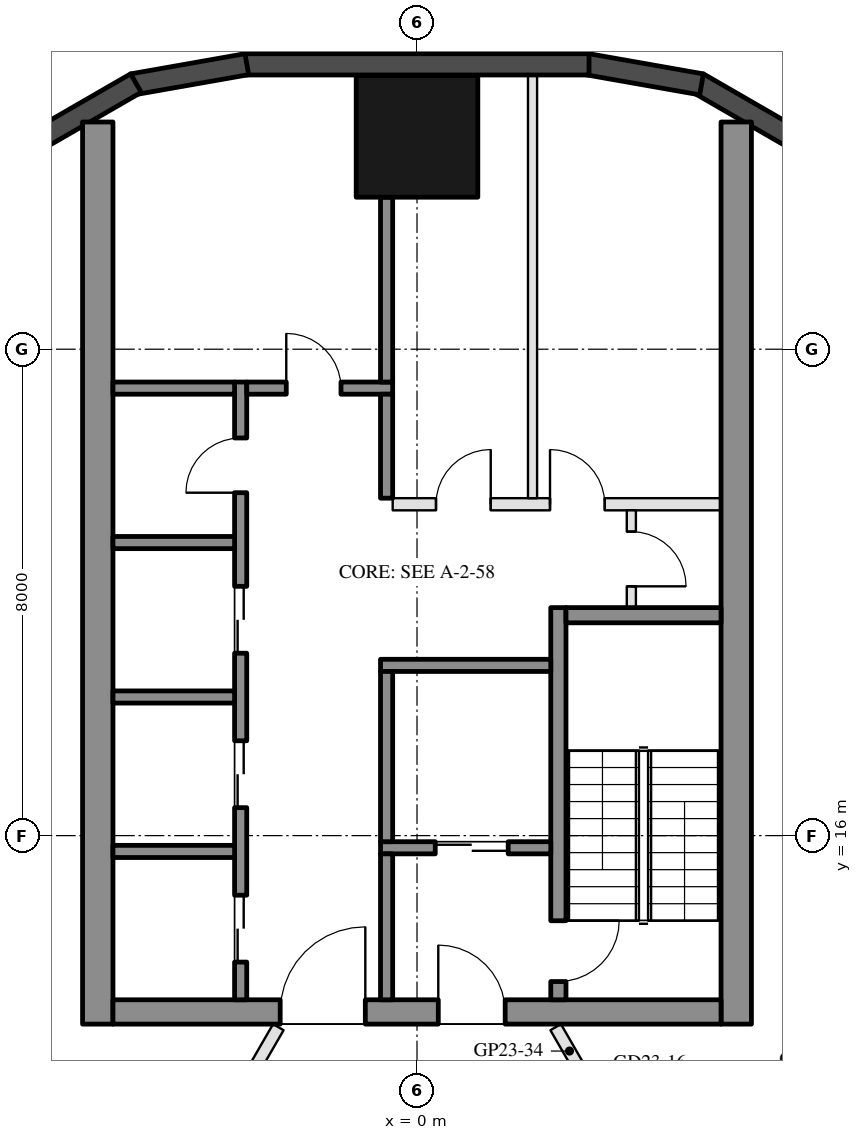
"""IFC4 building model, lengths in metres.
Left out: names, types, materials, properties, quantities, classifications, styles, units other than length and angle.
Written with IfcOpenShell. Run it as: python <this file> out.ifc"""

import sys

from ifc_helpers import new_model, si_unit, direction, frame, frame_2d, origin, origin_2d, place, context, subcontext, project, spatial, rectangle, hollow_rectangle, extrude, boolean, halfspace, element, fill, save


model = new_model("IFC4")
c1 = context("Model", 3, precision=1e-05, world=origin(), true_north=direction((0.0, 1.0)))
c2 = subcontext(c1, "Body", "Model", "MODEL_VIEW")
j1 = project(units=[si_unit("LENGTHUNIT", "METRE"), si_unit("PLANEANGLEUNIT", "RADIAN")], contexts=[c1])
p1 = place(None, origin())
s1 = spatial("IfcSite", under=j1, at=p1, CompositionType="ELEMENT")
p2 = place(p1, origin())
s2 = spatial("IfcBuilding", under=s1, at=p2, CompositionType="ELEMENT")
p3 = place(p2, frame((0.0, 0.0, 250.4)))
s3 = spatial("IfcBuildingStorey", under=s2, at=p3, CompositionType="ELEMENT", Elevation=250.4)
p4 = place(p3, frame((0.0, 27.5, 0.0), z_axis=(0.0, 0.0, 1.0), x_axis=(1.0, 0.0, 0.0)))
e1 = element("IfcColumn", 1, at=p4, inside=s3, PredefinedType="COLUMN", context=c2, shape_type="SweptSolid", body=[
    boolean("DIFFERENCE", extrude(hollow_rectangle(XDim=2.0, YDim=2.0, WallThickness=0.05, at=origin_2d()), origin(), (0.0, 0.0, 1.0), 3.7), halfspace(frame((0.0, 0.0, 3.588), z_axis=(0.0, 0.0, 1.0), x_axis=(1.0, 0.0, 0.0)), False)),
])
for number, where, z_axis, x_axis in (
    (2, (6.277, 27.422, 0.0), (0.0, 0.0, 1.0), (-0.866, 0.5, 0.0)),
    (3, (4.68, 28.356, 0.0), (0.0, 0.0, 1.0), (-0.985, 0.174, 0.0)),
):
    element("IfcWall", number, at=place(p3, frame(where, z_axis=z_axis, x_axis=x_axis)), inside=s3, PredefinedType="SOLIDWALL", context=c2, shape_type="SweptSolid", body=[
        extrude(rectangle(XDim=1.91, YDim=0.35, at=frame_2d((0.955, 0.0))), origin(), (0.0, 0.0, 1.0), 3.55),
    ])
p5 = place(p3, frame((2.829, 28.685, 0.0), z_axis=(0.0, 0.0, 1.0), x_axis=(-1.0, 0.0, 0.0)))
e4 = element("IfcWall", 4, at=p5, inside=s3, PredefinedType="SOLIDWALL", context=c2, shape_type="SweptSolid", body=[
    extrude(rectangle(XDim=5.658, YDim=0.35, at=frame_2d((2.829, 0.0))), origin(), (0.0, 0.0, 1.0), 3.55),
])
for number, where, z_axis, x_axis in (
    (5, (-2.799, 28.688, 0.0), (0.0, 0.0, 1.0), (-0.985, -0.174, 0.0)),
    (6, (-4.623, 28.377, 0.0), (0.0, 0.0, 1.0), (-0.866, -0.5, 0.0)),
):
    element("IfcWall", number, at=place(p3, frame(where, z_axis=z_axis, x_axis=x_axis)), inside=s3, PredefinedType="SOLIDWALL", context=c2, shape_type="SweptSolid", body=[
        extrude(rectangle(XDim=1.91, YDim=0.35, at=frame_2d((0.955, 0.0))), origin(), (0.0, 0.0, 1.0), 3.55),
    ])
for number, where, z_axis, x_axis in (
    (7, (5.25, 12.9, 0.0), (0.0, 0.0, 1.0), (0.0, 1.0, 0.0)),
    (8, (-5.25, 12.9, 0.0), (0.0, 0.0, 1.0), (0.0, 1.0, 0.0)),
):
    element("IfcWall", number, at=place(p3, frame(where, z_axis=z_axis, x_axis=x_axis)), inside=s3, PredefinedType="SHEAR", context=c2, shape_type="SweptSolid", body=[
        extrude(rectangle(XDim=14.837, YDim=0.5, at=frame_2d((7.418, 0.0))), origin(), (0.0, 0.0, 1.0), 3.5),
    ])
p6 = place(p3, frame((5.0, 13.1, 0.0), z_axis=(0.0, 0.0, 1.0), x_axis=(-1.0, 0.0, 0.0)))
e9 = element("IfcWall", 9, at=p6, inside=s3, PredefinedType="SHEAR", context=c2, shape_type="SweptSolid", body=[
    extrude(rectangle(XDim=10.0, YDim=0.4, at=frame_2d((5.0, 0.0))), origin(), (0.0, 0.0, 1.0), 3.5),
])
p7 = place(p6, frame((3.55, 0.0, 0.0)))
e10 = element("IfcOpeningElement", 10, at=p7, cuts=e9, PredefinedType="OPENING", context=c2, shape_type="SweptSolid", body=[
    extrude(rectangle(XDim=1.1, YDim=2.1, at=frame_2d((0.55, 1.05))), frame((0.0, 0.21, 0.0), z_axis=(0.0, -1.0, 0.0), x_axis=(1.0, 0.0, 0.0)), (0.0, 0.0, 1.0), 0.42),
])
p8 = place(p6, frame((5.85, 0.0, 0.0)))
e11 = element("IfcOpeningElement", 11, at=p8, cuts=e9, PredefinedType="OPENING", context=c2, shape_type="SweptSolid", body=[
    extrude(rectangle(XDim=1.4, YDim=2.1, at=frame_2d((0.7, 1.05))), frame((0.0, 0.21, 0.0), z_axis=(0.0, -1.0, 0.0), x_axis=(1.0, 0.0, 0.0)), (0.0, 0.0, 1.0), 0.42),
])
p9 = place(p3, frame((2.325, 13.3, 0.0), z_axis=(0.0, 0.0, 1.0), x_axis=(0.0, 1.0, 0.0)))
e12 = element("IfcWall", 12, at=p9, inside=s3, PredefinedType="SHEAR", context=c2, shape_type="SweptSolid", body=[
    extrude(rectangle(XDim=6.45, YDim=0.25, at=frame_2d((3.225, 0.0))), origin(), (0.0, 0.0, 1.0), 3.5),
])
p10 = place(p9, frame((0.3, 0.0, 0.0)))
e13 = element("IfcOpeningElement", 13, at=p10, cuts=e12, PredefinedType="OPENING", context=c2, shape_type="SweptSolid", body=[
    extrude(rectangle(XDim=1.0, YDim=2.1, at=frame_2d((0.5, 1.05))), frame((0.0, 0.135, 0.0), z_axis=(0.0, -1.0, 0.0), x_axis=(1.0, 0.0, 0.0)), (0.0, 0.0, 1.0), 0.27),
])
p11 = place(p3, frame((5.0, 19.625, 0.0), z_axis=(0.0, 0.0, 1.0), x_axis=(-1.0, 0.0, 0.0)))
e14 = element("IfcWall", 14, at=p11, inside=s3, PredefinedType="SHEAR", context=c2, shape_type="SweptSolid", body=[
    extrude(rectangle(XDim=2.55, YDim=0.25, at=frame_2d((1.275, 0.0))), origin(), (0.0, 0.0, 1.0), 3.5),
])
p12 = place(p3, frame((2.2, 18.8, 0.0), z_axis=(0.0, 0.0, 1.0), x_axis=(-1.0, 0.0, 0.0)))
e15 = element("IfcWall", 15, at=p12, inside=s3, PredefinedType="SHEAR", context=c2, shape_type="SweptSolid", body=[
    extrude(rectangle(XDim=2.8, YDim=0.2, at=frame_2d((1.4, 0.0))), origin(), (0.0, 0.0, 1.0), 3.5),
])
p13 = place(p3, frame((2.2, 15.8, 0.0), z_axis=(0.0, 0.0, 1.0), x_axis=(-1.0, 0.0, 0.0)))
e16 = element("IfcWall", 16, at=p13, inside=s3, PredefinedType="SHEAR", context=c2, shape_type="SweptSolid", body=[
    extrude(rectangle(XDim=2.8, YDim=0.2, at=frame_2d((1.4, 0.0))), origin(), (0.0, 0.0, 1.0), 3.5),
])
p14 = place(p13, frame((0.7, 0.0, 0.0)))
e17 = element("IfcOpeningElement", 17, at=p14, cuts=e16, PredefinedType="OPENING", context=c2, shape_type="SweptSolid", body=[
    extrude(rectangle(XDim=1.2, YDim=2.1, at=frame_2d((0.6, 1.05))), frame((0.0, 0.11, 0.0), z_axis=(0.0, -1.0, 0.0), x_axis=(1.0, 0.0, 0.0)), (0.0, 0.0, 1.0), 0.22),
])
p15 = place(p3, frame((-0.5, 15.9, 0.0), z_axis=(0.0, 0.0, 1.0), x_axis=(0.0, 1.0, 0.0)))
e18 = element("IfcWall", 18, at=p15, inside=s3, PredefinedType="SHEAR", context=c2, shape_type="SweptSolid", body=[
    extrude(rectangle(XDim=2.8, YDim=0.2, at=frame_2d((1.4, 0.0))), origin(), (0.0, 0.0, 1.0), 3.5),
])
p16 = place(p3, frame((-0.5, 13.3, 0.0), z_axis=(0.0, 0.0, 1.0), x_axis=(0.0, 1.0, 0.0)))
e19 = element("IfcWall", 19, at=p16, inside=s3, PredefinedType="SHEAR", context=c2, shape_type="SweptSolid", body=[
    extrude(rectangle(XDim=2.4, YDim=0.2, at=frame_2d((1.2, 0.0))), origin(), (0.0, 0.0, 1.0), 3.5),
])
p17 = place(p3, frame((-2.9, 13.3, 0.0), z_axis=(0.0, 0.0, 1.0), x_axis=(0.0, 1.0, 0.0)))
e20 = element("IfcWall", 20, at=p17, inside=s3, PredefinedType="SHEAR", context=c2, shape_type="SweptSolid", body=[
    extrude(rectangle(XDim=10.16, YDim=0.2, at=frame_2d((5.08, 0.0))), origin(), (0.0, 0.0, 1.0), 3.5),
])
p18 = place(p17, frame((0.62, 0.0, 0.0)))
e21 = element("IfcOpeningElement", 21, at=p18, cuts=e20, PredefinedType="OPENING", context=c2, shape_type="SweptSolid", body=[
    extrude(rectangle(XDim=1.1, YDim=2.1, at=frame_2d((0.55, 1.05))), frame((0.0, 0.11, 0.0), z_axis=(0.0, -1.0, 0.0), x_axis=(1.0, 0.0, 0.0)), (0.0, 0.0, 1.0), 0.22),
])
p19 = place(p17, frame((3.16, 0.0, 0.0)))
e22 = element("IfcOpeningElement", 22, at=p19, cuts=e20, PredefinedType="OPENING", context=c2, shape_type="SweptSolid", body=[
    extrude(rectangle(XDim=1.1, YDim=2.1, at=frame_2d((0.55, 1.05))), frame((0.0, 0.11, 0.0), z_axis=(0.0, -1.0, 0.0), x_axis=(1.0, 0.0, 0.0)), (0.0, 0.0, 1.0), 0.22),
])
p20 = place(p17, frame((5.7, 0.0, 0.0)))
e23 = element("IfcOpeningElement", 23, at=p20, cuts=e20, PredefinedType="OPENING", context=c2, shape_type="SweptSolid", body=[
    extrude(rectangle(XDim=1.1, YDim=2.1, at=frame_2d((0.55, 1.05))), frame((0.0, 0.11, 0.0), z_axis=(0.0, -1.0, 0.0), x_axis=(1.0, 0.0, 0.0)), (0.0, 0.0, 1.0), 0.22),
])
p21 = place(p17, frame((8.34, 0.0, 0.0)))
e24 = element("IfcOpeningElement", 24, at=p21, cuts=e20, PredefinedType="OPENING", context=c2, shape_type="SweptSolid", body=[
    extrude(rectangle(XDim=0.9, YDim=2.1, at=frame_2d((0.45, 1.05))), frame((0.0, 0.11, 0.0), z_axis=(0.0, -1.0, 0.0), x_axis=(1.0, 0.0, 0.0)), (0.0, 0.0, 1.0), 0.22),
])
p22 = place(p3, frame((-0.4, 23.36, 0.0), z_axis=(0.0, 0.0, 1.0), x_axis=(-1.0, 0.0, 0.0)))
e25 = element("IfcWall", 25, at=p22, inside=s3, PredefinedType="SHEAR", context=c2, shape_type="SweptSolid", body=[
    extrude(rectangle(XDim=2.4, YDim=0.2, at=frame_2d((1.2, 0.0))), origin(), (0.0, 0.0, 1.0), 3.5),
])
p23 = place(p22, frame((0.85, 0.0, 0.0)))
e26 = element("IfcOpeningElement", 26, at=p23, cuts=e25, PredefinedType="OPENING", context=c2, shape_type="SweptSolid", body=[
    extrude(rectangle(XDim=0.9, YDim=2.1, at=frame_2d((0.45, 1.05))), frame((0.0, 0.11, 0.0), z_axis=(0.0, -1.0, 0.0), x_axis=(1.0, 0.0, 0.0)), (0.0, 0.0, 1.0), 0.22),
])
p24 = place(p3, frame((-0.5, 21.55, 0.0), z_axis=(0.0, 0.0, 1.0), x_axis=(0.0, 1.0, 0.0)))
e27 = element("IfcWall", 27, at=p24, inside=s3, PredefinedType="SHEAR", context=c2, shape_type="SweptSolid", body=[
    extrude(rectangle(XDim=1.71, YDim=0.2, at=frame_2d((0.855, 0.0))), origin(), (0.0, 0.0, 1.0), 3.5),
])
for number, where, z_axis, x_axis in (
    (28, (-3.0, 15.74, 0.0), (0.0, 0.0, 1.0), (-1.0, 0.0, 0.0)),
    (29, (-3.0, 18.28, 0.0), (0.0, 0.0, 1.0), (-1.0, 0.0, 0.0)),
    (30, (-3.0, 20.82, 0.0), (0.0, 0.0, 1.0), (-1.0, 0.0, 0.0)),
    (31, (-3.0, 23.36, 0.0), (0.0, 0.0, 1.0), (-1.0, 0.0, 0.0)),
):
    element("IfcWall", number, at=place(p3, frame(where, z_axis=z_axis, x_axis=x_axis)), inside=s3, PredefinedType="SHEAR", context=c2, shape_type="SweptSolid", body=[
        extrude(rectangle(XDim=2.0, YDim=0.2, at=frame_2d((1.0, 0.0))), origin(), (0.0, 0.0, 1.0), 3.5),
    ])
p25 = place(p3, frame((-0.5, 23.46, 0.0), z_axis=(0.0, 0.0, 1.0), x_axis=(0.0, 1.0, 0.0)))
e32 = element("IfcWall", 32, at=p25, inside=s3, PredefinedType="SHEAR", context=c2, shape_type="SweptSolid", body=[
    extrude(rectangle(XDim=3.04, YDim=0.2, at=frame_2d((1.52, 0.0))), origin(), (0.0, 0.0, 1.0), 3.5),
])
p26 = place(p3, frame((5.0, 21.45, 0.0), z_axis=(0.0, 0.0, 1.0), x_axis=(-1.0, 0.0, 0.0)))
e33 = element("IfcWall", 33, at=p26, inside=s3, PredefinedType="PARTITIONING", context=c2, shape_type="SweptSolid", body=[
    extrude(rectangle(XDim=5.4, YDim=0.2, at=frame_2d((2.7, 0.0))), origin(), (0.0, 0.0, 1.0), 3.5),
])
p27 = place(p26, frame((1.913, 0.0, 0.0)))
e34 = element("IfcOpeningElement", 34, at=p27, cuts=e33, PredefinedType="OPENING", context=c2, shape_type="SweptSolid", body=[
    extrude(rectangle(XDim=0.9, YDim=2.1, at=frame_2d((0.45, 1.05))), frame((0.0, 0.11, 0.0), z_axis=(0.0, -1.0, 0.0), x_axis=(1.0, 0.0, 0.0)), (0.0, 0.0, 1.0), 0.22),
])
p28 = place(p26, frame((3.788, 0.0, 0.0)))
e35 = element("IfcOpeningElement", 35, at=p28, cuts=e33, PredefinedType="OPENING", context=c2, shape_type="SweptSolid", body=[
    extrude(rectangle(XDim=0.9, YDim=2.1, at=frame_2d((0.45, 1.05))), frame((0.0, 0.11, 0.0), z_axis=(0.0, -1.0, 0.0), x_axis=(1.0, 0.0, 0.0)), (0.0, 0.0, 1.0), 0.22),
])
p29 = place(p3, frame((3.525, 19.75, 0.0), z_axis=(0.0, 0.0, 1.0), x_axis=(0.0, 1.0, 0.0)))
e36 = element("IfcWall", 36, at=p29, inside=s3, PredefinedType="PARTITIONING", context=c2, shape_type="SweptSolid", body=[
    extrude(rectangle(XDim=1.6, YDim=0.15, at=frame_2d((0.8, 0.0))), origin(), (0.0, 0.0, 1.0), 3.5),
])
p30 = place(p29, frame((0.35, 0.0, 0.0)))
e37 = element("IfcOpeningElement", 37, at=p30, cuts=e36, PredefinedType="OPENING", context=c2, shape_type="SweptSolid", body=[
    extrude(rectangle(XDim=0.9, YDim=2.1, at=frame_2d((0.45, 1.05))), frame((0.0, 0.085, 0.0), z_axis=(0.0, -1.0, 0.0), x_axis=(1.0, 0.0, 0.0)), (0.0, 0.0, 1.0), 0.17),
])
p31 = place(p3, frame((1.9, 21.55, 0.0), z_axis=(0.0, 0.0, 1.0), x_axis=(0.0, 1.0, 0.0)))
e38 = element("IfcWall", 38, at=p31, inside=s3, PredefinedType="PARTITIONING", context=c2, shape_type="SweptSolid", body=[
    extrude(rectangle(XDim=6.95, YDim=0.15, at=frame_2d((3.475, 0.0))), origin(), (0.0, 0.0, 1.0), 3.5),
])
p32 = place(p3, frame((13.952, 14.395, 0.0), z_axis=(0.0, 0.0, 1.0), x_axis=(-0.892890171934, -0.450274517226, 0.0)))
e39 = element("IfcWall", 39, at=p32, inside=s3, PredefinedType="PARTITIONING", context=c2, shape_type="SweptSolid", body=[
    extrude(rectangle(XDim=10.998, YDim=0.2, at=frame_2d((5.499, 0.0))), origin(), (0.0, 0.0, 1.0), 3.1),
])
p33 = place(p3, frame((2.281, 12.85, 0.0), z_axis=(0.0, 0.0, 1.0), x_axis=(0.499985062256, -0.866034027923, 0.0)))
e40 = element("IfcWall", 40, at=p33, inside=s3, PredefinedType="PARTITIONING", context=c2, shape_type="SweptSolid", body=[
    extrude(rectangle(XDim=3.782, YDim=0.2, at=frame_2d((1.891, 0.0))), origin(), (0.0, 0.0, 1.0), 2.95),
])
p34 = place(p33, frame((1.391, 0.0, 0.0)))
e41 = element("IfcOpeningElement", 41, at=p34, cuts=e40, PredefinedType="OPENING", context=c2, shape_type="SweptSolid", body=[
    extrude(rectangle(XDim=1.0, YDim=2.1, at=frame_2d((0.5, 1.05))), frame((0.0, 0.11, 0.0), z_axis=(0.0, -1.0, 0.0), x_axis=(1.0, 0.0, 0.0)), (0.0, 0.0, 1.0), 0.22),
])
p35 = place(p3, frame((-5.221, 7.757, 0.0), z_axis=(0.0, 0.0, 1.0), x_axis=(0.49998360248, 0.86603487069, 0.0)))
e42 = element("IfcWall", 42, at=p35, inside=s3, PredefinedType="PARTITIONING", context=c2, shape_type="SweptSolid", body=[
    extrude(rectangle(XDim=5.881, YDim=0.2, at=frame_2d((2.94, 0.0))), origin(), (0.0, 0.0, 1.0), 2.95),
])
p36 = place(p35, frame((2.44, 0.0, 0.0)))
e43 = element("IfcOpeningElement", 43, at=p36, cuts=e42, PredefinedType="OPENING", context=c2, shape_type="SweptSolid", body=[
    extrude(rectangle(XDim=1.0, YDim=2.1, at=frame_2d((0.5, 1.05))), frame((0.0, 0.11, 0.0), z_axis=(0.0, -1.0, 0.0), x_axis=(1.0, 0.0, 0.0)), (0.0, 0.0, 1.0), 0.22),
])
p37 = place(p14, origin())
e44 = element("IfcDoor", 44, at=p37, inside=s3, OperationType="DOUBLE_DOOR_SLIDING", PredefinedType="DOOR", context=c2, shape_type="SweptSolid", body=[
    extrude(rectangle(XDim=1.2, YDim=2.1, at=frame_2d((0.6, 1.05))), frame((0.0, 0.025, 0.0), z_axis=(0.0, -1.0, 0.0), x_axis=(1.0, 0.0, 0.0)), (0.0, 0.0, 1.0), 0.05),
])
fill(e17, e44)
p38 = place(p30, frame((0.9, 0.0, 0.0), z_axis=(0.0, 0.0, 1.0), x_axis=(-1.0, 0.0, 0.0)))
e45 = element("IfcDoor", 45, at=p38, inside=s3, OperationType="SINGLE_SWING_RIGHT", PredefinedType="DOOR", context=c2, shape_type="SweptSolid", body=[
    extrude(rectangle(XDim=0.9, YDim=2.1, at=frame_2d((0.45, 1.05))), frame((0.0, 0.025, 0.0), z_axis=(0.0, -1.0, 0.0), x_axis=(1.0, 0.0, 0.0)), (0.0, 0.0, 1.0), 0.05),
])
fill(e37, e45)
p39 = place(p18, origin())
e46 = element("IfcDoor", 46, at=p39, inside=s3, OperationType="DOUBLE_DOOR_SLIDING", PredefinedType="DOOR", context=c2, shape_type="SweptSolid", body=[
    extrude(rectangle(XDim=1.1, YDim=2.1, at=frame_2d((0.55, 1.05))), frame((0.0, 0.025, 0.0), z_axis=(0.0, -1.0, 0.0), x_axis=(1.0, 0.0, 0.0)), (0.0, 0.0, 1.0), 0.05),
])
fill(e21, e46)
p40 = place(p19, origin())
e47 = element("IfcDoor", 47, at=p40, inside=s3, OperationType="DOUBLE_DOOR_SLIDING", PredefinedType="DOOR", context=c2, shape_type="SweptSolid", body=[
    extrude(rectangle(XDim=1.1, YDim=2.1, at=frame_2d((0.55, 1.05))), frame((0.0, 0.025, 0.0), z_axis=(0.0, -1.0, 0.0), x_axis=(1.0, 0.0, 0.0)), (0.0, 0.0, 1.0), 0.05),
])
fill(e22, e47)
p41 = place(p20, origin())
e48 = element("IfcDoor", 48, at=p41, inside=s3, OperationType="DOUBLE_DOOR_SLIDING", PredefinedType="DOOR", context=c2, shape_type="SweptSolid", body=[
    extrude(rectangle(XDim=1.1, YDim=2.1, at=frame_2d((0.55, 1.05))), frame((0.0, 0.025, 0.0), z_axis=(0.0, -1.0, 0.0), x_axis=(1.0, 0.0, 0.0)), (0.0, 0.0, 1.0), 0.05),
])
fill(e23, e48)
p42 = place(p21, origin())
e49 = element("IfcDoor", 49, at=p42, inside=s3, OperationType="SINGLE_SWING_LEFT", PredefinedType="DOOR", context=c2, shape_type="SweptSolid", body=[
    extrude(rectangle(XDim=0.9, YDim=2.1, at=frame_2d((0.45, 1.05))), frame((0.0, 0.025, 0.0), z_axis=(0.0, -1.0, 0.0), x_axis=(1.0, 0.0, 0.0)), (0.0, 0.0, 1.0), 0.05),
])
fill(e24, e49)
p43 = place(p23, frame((0.9, 0.0, 0.0), z_axis=(0.0, 0.0, 1.0), x_axis=(-1.0, 0.0, 0.0)))
e50 = element("IfcDoor", 50, at=p43, inside=s3, OperationType="SINGLE_SWING_LEFT", PredefinedType="DOOR", context=c2, shape_type="SweptSolid", body=[
    extrude(rectangle(XDim=0.9, YDim=2.1, at=frame_2d((0.45, 1.05))), frame((0.0, 0.025, 0.0), z_axis=(0.0, -1.0, 0.0), x_axis=(1.0, 0.0, 0.0)), (0.0, 0.0, 1.0), 0.05),
])
fill(e26, e50)
p44 = place(p27, frame((0.9, 0.0, 0.0), z_axis=(0.0, 0.0, 1.0), x_axis=(-1.0, 0.0, 0.0)))
e51 = element("IfcDoor", 51, at=p44, inside=s3, OperationType="SINGLE_SWING_LEFT", PredefinedType="DOOR", context=c2, shape_type="SweptSolid", body=[
    extrude(rectangle(XDim=0.9, YDim=2.1, at=frame_2d((0.45, 1.05))), frame((0.0, 0.025, 0.0), z_axis=(0.0, -1.0, 0.0), x_axis=(1.0, 0.0, 0.0)), (0.0, 0.0, 1.0), 0.05),
])
fill(e34, e51)
p45 = place(p28, frame((0.9, 0.0, 0.0), z_axis=(0.0, 0.0, 1.0), x_axis=(-1.0, 0.0, 0.0)))
e52 = element("IfcDoor", 52, at=p45, inside=s3, OperationType="SINGLE_SWING_RIGHT", PredefinedType="DOOR", context=c2, shape_type="SweptSolid", body=[
    extrude(rectangle(XDim=0.9, YDim=2.1, at=frame_2d((0.45, 1.05))), frame((0.0, 0.025, 0.0), z_axis=(0.0, -1.0, 0.0), x_axis=(1.0, 0.0, 0.0)), (0.0, 0.0, 1.0), 0.05),
])
fill(e35, e52)
p46 = place(p7, frame((1.1, 0.0, 0.0), z_axis=(0.0, 0.0, 1.0), x_axis=(-1.0, 0.0, 0.0)))
e53 = element("IfcDoor", 53, at=p46, inside=s3, OperationType="SINGLE_SWING_LEFT", PredefinedType="DOOR", context=c2, shape_type="SweptSolid", body=[
    extrude(rectangle(XDim=1.1, YDim=2.1, at=frame_2d((0.55, 1.05))), frame((0.0, 0.025, 0.0), z_axis=(0.0, -1.0, 0.0), x_axis=(1.0, 0.0, 0.0)), (0.0, 0.0, 1.0), 0.05),
])
fill(e10, e53)
p47 = place(p8, frame((1.4, 0.0, 0.0), z_axis=(0.0, 0.0, 1.0), x_axis=(-1.0, 0.0, 0.0)))
e54 = element("IfcDoor", 54, at=p47, inside=s3, OperationType="DOUBLE_DOOR_SINGLE_SWING", PredefinedType="DOOR", context=c2, shape_type="SweptSolid", body=[
    extrude(rectangle(XDim=1.4, YDim=2.1, at=frame_2d((0.7, 1.05))), frame((0.0, 0.025, 0.0), z_axis=(0.0, -1.0, 0.0), x_axis=(1.0, 0.0, 0.0)), (0.0, 0.0, 1.0), 0.05),
])
fill(e11, e54)
p48 = place(p10, frame((1.0, 0.0, 0.0), z_axis=(0.0, 0.0, 1.0), x_axis=(-1.0, 0.0, 0.0)))
e55 = element("IfcDoor", 55, at=p48, inside=s3, OperationType="SINGLE_SWING_LEFT", PredefinedType="DOOR", context=c2, shape_type="SweptSolid", body=[
    extrude(rectangle(XDim=1.0, YDim=2.1, at=frame_2d((0.5, 1.05))), frame((0.0, 0.025, 0.0), z_axis=(0.0, -1.0, 0.0), x_axis=(1.0, 0.0, 0.0)), (0.0, 0.0, 1.0), 0.05),
])
fill(e13, e55)
save(model, sys.argv[1])
